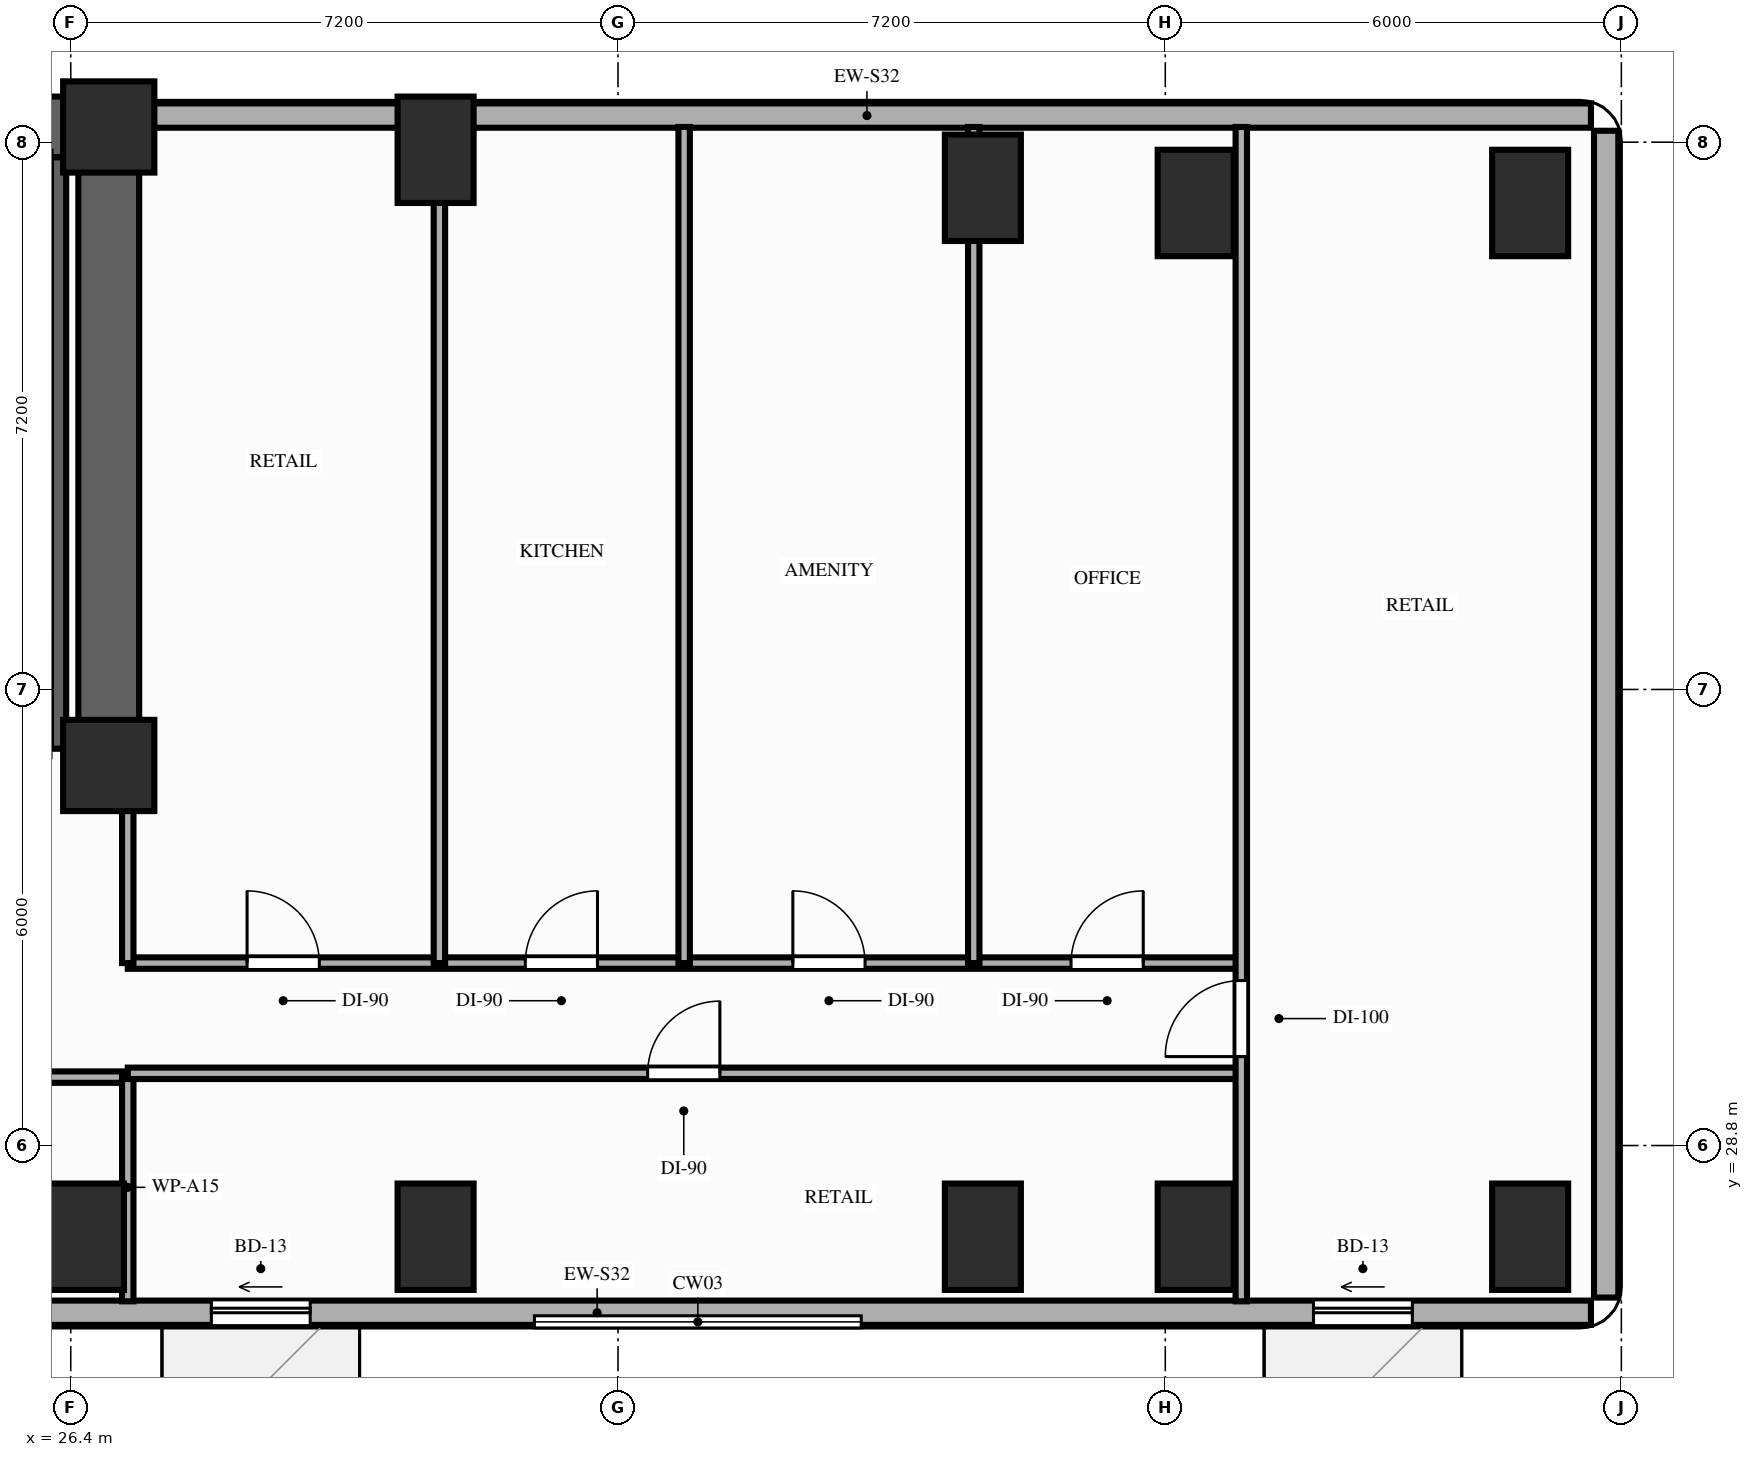
"""IFC4 building model, lengths in metres.
Left out: names, types, materials, properties, quantities, classifications, styles, units other than length and angle.
Written with IfcOpenShell. Run it as: python <this file> out.ifc"""

import sys

from ifc_helpers import new_model, si_unit, direction, frame, frame_2d, origin, origin_2d, place, context, subcontext, project, spatial, rectangle, extrude, element, fill, save


model = new_model("IFC4")
c1 = context("Model", 3, precision=1e-05, world=origin(), true_north=direction((0.0, 1.0)))
c2 = subcontext(c1, "Body", "Model", "MODEL_VIEW")
j1 = project(units=[si_unit("LENGTHUNIT", "METRE"), si_unit("PLANEANGLEUNIT", "RADIAN")], contexts=[c1])
p1 = place(None, origin())
s1 = spatial("IfcSite", under=j1, at=p1, CompositionType="ELEMENT")
p2 = place(p1, origin())
s2 = spatial("IfcBuilding", under=s1, at=p2, CompositionType="ELEMENT")
p3 = place(p2, frame((0.0, 0.0, 56.4)))
s3 = spatial("IfcBuildingStorey", under=s2, at=p3, CompositionType="ELEMENT", Elevation=56.4)
for number, where, z_axis, x_axis in (
    (1, (26.9, 33.8, 0.0), (0.0, 0.0, 1.0), (1.0, 0.0, 0.0)),
    (2, (26.9, 42.2, 0.0), (0.0, 0.0, 1.0), (1.0, 0.0, 0.0)),
):
    element("IfcColumn", number, at=place(p3, frame(where, z_axis=z_axis, x_axis=x_axis)), inside=s3, PredefinedType="COLUMN", context=c2, shape_type="SweptSolid", body=[
        extrude(rectangle(XDim=1.2, YDim=1.2, at=origin_2d()), origin(), (0.0, 0.0, 1.0), 3.2),
    ])
for number, where, z_axis, x_axis in (
    (3, (26.6, 27.6, 0.0), (0.0, 0.0, 1.0), (1.0, 0.0, 0.0)),
    (4, (31.2, 27.6, 0.0), (0.0, 0.0, 1.0), (1.0, 0.0, 0.0)),
    (5, (31.2, 41.9, 0.0), (0.0, 0.0, 1.0), (1.0, 0.0, 0.0)),
    (6, (38.4, 27.6, 0.0), (0.0, 0.0, 1.0), (1.0, 0.0, 0.0)),
    (7, (38.4, 41.4, 0.0), (0.0, 0.0, 1.0), (1.0, 0.0, 0.0)),
    (8, (41.2, 27.6, 0.0), (0.0, 0.0, 1.0), (1.0, 0.0, 0.0)),
    (9, (41.2, 41.2, 0.0), (0.0, 0.0, 1.0), (1.0, 0.0, 0.0)),
    (10, (45.6, 27.6, 0.0), (0.0, 0.0, 1.0), (1.0, 0.0, 0.0)),
    (11, (45.6, 41.2, 0.0), (0.0, 0.0, 1.0), (1.0, 0.0, 0.0)),
):
    element("IfcColumn", number, at=place(p3, frame(where, z_axis=z_axis, x_axis=x_axis)), inside=s3, PredefinedType="COLUMN", context=c2, shape_type="SweptSolid", body=[
        extrude(rectangle(XDim=1.0, YDim=1.4, at=origin_2d()), origin(), (0.0, 0.0, 1.0), 3.2),
    ])
p4 = place(p3, frame((46.4, 42.35, 0.0), z_axis=(0.0, 0.0, 1.0), x_axis=(-1.0, 0.0, 0.0)))
e12 = element("IfcWall", 12, at=p4, inside=s3, PredefinedType="STANDARD", context=c2, shape_type="SweptSolid", body=[
    extrude(rectangle(XDim=19.05, YDim=0.32, at=frame_2d((9.525, 0.0))), origin(), (0.0, 0.0, 1.0), 2.4),
])
p5 = place(p3, frame((20.25, 26.6, 0.0), z_axis=(0.0, 0.0, 1.0), x_axis=(1.0, 0.0, 0.0)))
e13 = element("IfcWall", 13, at=p5, inside=s3, PredefinedType="STANDARD", context=c2, shape_type="SweptSolid", body=[
    extrude(rectangle(XDim=26.15, YDim=0.32, at=frame_2d((13.075, 0.0))), origin(), (0.0, 0.0, 1.0), 3.02),
])
p6 = place(p5, frame((8.0, 0.0, 0.0)))
e14 = element("IfcOpeningElement", 14, at=p6, cuts=e13, PredefinedType="OPENING", context=c2, shape_type="SweptSolid", body=[
    extrude(rectangle(XDim=1.3, YDim=2.08, at=frame_2d((0.65, 1.04))), frame((0.0, 0.17, 0.0), z_axis=(0.0, -1.0, 0.0), x_axis=(1.0, 0.0, 0.0)), (0.0, 0.0, 1.0), 0.34),
])
p7 = place(p5, frame((22.5, 0.0, 0.0)))
e15 = element("IfcOpeningElement", 15, at=p7, cuts=e13, PredefinedType="OPENING", context=c2, shape_type="SweptSolid", body=[
    extrude(rectangle(XDim=1.3, YDim=2.08, at=frame_2d((0.65, 1.04))), frame((0.0, 0.17, 0.0), z_axis=(0.0, -1.0, 0.0), x_axis=(1.0, 0.0, 0.0)), (0.0, 0.0, 1.0), 0.34),
])
p8 = place(p5, frame((1.95, 0.0, 0.85)))
e16 = element("IfcOpeningElement", 16, at=p8, cuts=e13, PredefinedType="OPENING", context=c2, shape_type="SweptSolid", body=[
    extrude(rectangle(XDim=2.4, YDim=1.8, at=frame_2d((1.2, 0.9))), frame((0.0, 0.17, 0.0), z_axis=(0.0, -1.0, 0.0), x_axis=(1.0, 0.0, 0.0)), (0.0, 0.0, 1.0), 0.34),
])
p9 = place(p3, frame((46.6, 26.8, 0.0), z_axis=(0.0, 0.0, 1.0), x_axis=(0.0, 1.0, 0.0)))
e17 = element("IfcWall", 17, at=p9, inside=s3, PredefinedType="STANDARD", context=c2, shape_type="SweptSolid", body=[
    extrude(rectangle(XDim=15.35, YDim=0.32, at=frame_2d((7.675, 0.0))), origin(), (0.0, 0.0, 1.0), 3.02),
])
p10 = place(p3, frame((6.45, 42.2, 0.0), z_axis=(0.0, 0.0, 1.0), x_axis=(1.0, 0.0, 0.0)))
e18 = element("IfcWall", 18, at=p10, inside=s3, PredefinedType="SHEAR", context=c2, shape_type="SweptSolid", body=[
    extrude(rectangle(XDim=20.45, YDim=0.8, at=frame_2d((10.225, 0.0))), origin(), (0.0, 0.0, 1.0), 3.02),
])
p11 = place(p3, frame((26.9, 33.8, 0.0), z_axis=(0.0, 0.0, 1.0), x_axis=(0.0, 1.0, 0.0)))
e19 = element("IfcWall", 19, at=p11, inside=s3, PredefinedType="SHEAR", context=c2, shape_type="SweptSolid", body=[
    extrude(rectangle(XDim=7.95, YDim=0.8, at=frame_2d((3.975, 0.0))), origin(), (0.0, 0.0, 1.0), 3.02),
])
p12 = place(p3, frame((26.24, 34.02, 0.0), z_axis=(0.0, 0.0, 1.0), x_axis=(0.0, 1.0, 0.0)))
e20 = element("IfcWall", 20, at=p12, inside=s3, PredefinedType="SHEAR", context=c2, shape_type="SweptSolid", body=[
    extrude(rectangle(XDim=7.78, YDim=0.2, at=frame_2d((3.89, 0.0))), origin(), (0.0, 0.0, 1.0), 3.02),
])
p13 = place(p3, frame((20.45, 29.7, 0.0), z_axis=(0.0, 0.0, 1.0), x_axis=(1.0, 0.0, 0.0)))
e21 = element("IfcWall", 21, at=p13, inside=s3, PredefinedType="PARTITIONING", context=c2, shape_type="SweptSolid", body=[
    extrude(rectangle(XDim=6.7, YDim=0.15, at=frame_2d((3.35, 0.0))), origin(), (0.0, 0.0, 1.0), 3.02),
])
p14 = place(p13, frame((2.8, 0.0, 0.0)))
e22 = element("IfcOpeningElement", 22, at=p14, cuts=e21, PredefinedType="OPENING", context=c2, shape_type="SweptSolid", body=[
    extrude(rectangle(XDim=0.95, YDim=2.15, at=frame_2d((0.475, 1.075))), frame((0.0, 0.085, 0.0), z_axis=(0.0, -1.0, 0.0), x_axis=(1.0, 0.0, 0.0)), (0.0, 0.0, 1.0), 0.17),
])
p15 = place(p3, frame((27.15, 26.75, 0.0), z_axis=(0.0, 0.0, 1.0), x_axis=(0.0, 1.0, 0.0)))
e23 = element("IfcWall", 23, at=p15, inside=s3, PredefinedType="PARTITIONING", context=c2, shape_type="SweptSolid", body=[
    extrude(rectangle(XDim=3.0, YDim=0.15, at=frame_2d((1.5, 0.0))), origin(), (0.0, 0.0, 1.0), 2.4),
])
p16 = place(p3, frame((27.15, 29.75, 0.0), z_axis=(0.0, 0.0, 1.0), x_axis=(1.0, 0.0, 0.0)))
e24 = element("IfcWall", 24, at=p16, inside=s3, PredefinedType="PARTITIONING", context=c2, shape_type="SweptSolid", body=[
    extrude(rectangle(XDim=14.65, YDim=0.15, at=frame_2d((7.325, 0.0))), origin(), (0.0, 0.0, 1.0), 2.4),
])
p17 = place(p16, frame((6.84, 0.0, 0.0)))
e25 = element("IfcOpeningElement", 25, at=p17, cuts=e24, PredefinedType="OPENING", context=c2, shape_type="SweptSolid", body=[
    extrude(rectangle(XDim=0.95, YDim=2.15, at=frame_2d((0.475, 1.075))), frame((0.0, 0.085, 0.0), z_axis=(0.0, -1.0, 0.0), x_axis=(1.0, 0.0, 0.0)), (0.0, 0.0, 1.0), 0.17),
])
p18 = place(p3, frame((27.15, 31.2, 0.0), z_axis=(0.0, 0.0, 1.0), x_axis=(1.0, 0.0, 0.0)))
e26 = element("IfcWall", 26, at=p18, inside=s3, PredefinedType="PARTITIONING", context=c2, shape_type="SweptSolid", body=[
    extrude(rectangle(XDim=14.65, YDim=0.15, at=frame_2d((7.325, 0.0))), origin(), (0.0, 0.0, 1.0), 2.4),
])
p19 = place(p18, frame((1.57, 0.0, 0.0)))
e27 = element("IfcOpeningElement", 27, at=p19, cuts=e26, PredefinedType="OPENING", context=c2, shape_type="SweptSolid", body=[
    extrude(rectangle(XDim=0.95, YDim=2.15, at=frame_2d((0.475, 1.075))), frame((0.0, 0.085, 0.0), z_axis=(0.0, -1.0, 0.0), x_axis=(1.0, 0.0, 0.0)), (0.0, 0.0, 1.0), 0.17),
])
p20 = place(p18, frame((5.23, 0.0, 0.0)))
e28 = element("IfcOpeningElement", 28, at=p20, cuts=e26, PredefinedType="OPENING", context=c2, shape_type="SweptSolid", body=[
    extrude(rectangle(XDim=0.95, YDim=2.15, at=frame_2d((0.475, 1.075))), frame((0.0, 0.085, 0.0), z_axis=(0.0, -1.0, 0.0), x_axis=(1.0, 0.0, 0.0)), (0.0, 0.0, 1.0), 0.17),
])
p21 = place(p18, frame((8.75, 0.0, 0.0)))
e29 = element("IfcOpeningElement", 29, at=p21, cuts=e26, PredefinedType="OPENING", context=c2, shape_type="SweptSolid", body=[
    extrude(rectangle(XDim=0.95, YDim=2.15, at=frame_2d((0.475, 1.075))), frame((0.0, 0.085, 0.0), z_axis=(0.0, -1.0, 0.0), x_axis=(1.0, 0.0, 0.0)), (0.0, 0.0, 1.0), 0.17),
])
p22 = place(p18, frame((12.41, 0.0, 0.0)))
e30 = element("IfcOpeningElement", 30, at=p22, cuts=e26, PredefinedType="OPENING", context=c2, shape_type="SweptSolid", body=[
    extrude(rectangle(XDim=0.95, YDim=2.15, at=frame_2d((0.475, 1.075))), frame((0.0, 0.085, 0.0), z_axis=(0.0, -1.0, 0.0), x_axis=(1.0, 0.0, 0.0)), (0.0, 0.0, 1.0), 0.17),
])
p23 = place(p3, frame((27.15, 31.2, 0.0), z_axis=(0.0, 0.0, 1.0), x_axis=(0.0, 1.0, 0.0)))
e31 = element("IfcWall", 31, at=p23, inside=s3, PredefinedType="PARTITIONING", context=c2, shape_type="SweptSolid", body=[
    extrude(rectangle(XDim=2.48, YDim=0.15, at=frame_2d((1.24, 0.0))), origin(), (0.0, 0.0, 1.0), 2.4),
])
p24 = place(p3, frame((41.8, 26.75, 0.0), z_axis=(0.0, 0.0, 1.0), x_axis=(0.0, 1.0, 0.0)))
e32 = element("IfcWall", 32, at=p24, inside=s3, PredefinedType="PARTITIONING", context=c2, shape_type="SweptSolid", body=[
    extrude(rectangle(XDim=15.45, YDim=0.15, at=frame_2d((7.725, 0.0))), origin(), (0.0, 0.0, 1.0), 2.4),
])
p25 = place(p24, frame((3.22, 0.0, 0.0)))
e33 = element("IfcOpeningElement", 33, at=p25, cuts=e32, PredefinedType="OPENING", context=c2, shape_type="SweptSolid", body=[
    extrude(rectangle(XDim=1.0, YDim=2.15, at=frame_2d((0.5, 1.075))), frame((0.0, 0.085, 0.0), z_axis=(0.0, -1.0, 0.0), x_axis=(1.0, 0.0, 0.0)), (0.0, 0.0, 1.0), 0.17),
])
for number, where, z_axis, x_axis in (
    (34, (31.25, 31.2, 0.0), (0.0, 0.0, 1.0), (0.0, 1.0, 0.0)),
    (35, (34.47, 31.2, 0.0), (0.0, 0.0, 1.0), (0.0, 1.0, 0.0)),
    (36, (38.28, 31.2, 0.0), (0.0, 0.0, 1.0), (0.0, 1.0, 0.0)),
):
    element("IfcWall", number, at=place(p3, frame(where, z_axis=z_axis, x_axis=x_axis)), inside=s3, PredefinedType="PARTITIONING", context=c2, shape_type="SweptSolid", body=[
        extrude(rectangle(XDim=11.0, YDim=0.15, at=frame_2d((5.5, 0.0))), origin(), (0.0, 0.0, 1.0), 2.4),
    ])
p26 = place(p6, origin())
e37 = element("IfcDoor", 37, at=p26, inside=s3, OperationType="SLIDING_TO_LEFT", PredefinedType="DOOR", context=c2, shape_type="SweptSolid", body=[
    extrude(rectangle(XDim=1.3, YDim=2.08, at=frame_2d((0.65, 1.04))), frame((0.0, 0.025, 0.0), z_axis=(0.0, -1.0, 0.0), x_axis=(1.0, 0.0, 0.0)), (0.0, 0.0, 1.0), 0.05),
])
fill(e14, e37)
p27 = place(p7, origin())
e38 = element("IfcDoor", 38, at=p27, inside=s3, OperationType="SLIDING_TO_LEFT", PredefinedType="DOOR", context=c2, shape_type="SweptSolid", body=[
    extrude(rectangle(XDim=1.3, YDim=2.08, at=frame_2d((0.65, 1.04))), frame((0.0, 0.025, 0.0), z_axis=(0.0, -1.0, 0.0), x_axis=(1.0, 0.0, 0.0)), (0.0, 0.0, 1.0), 0.05),
])
fill(e15, e38)
p28 = place(p25, origin())
e39 = element("IfcDoor", 39, at=p28, inside=s3, OperationType="SINGLE_SWING_LEFT", PredefinedType="DOOR", context=c2, shape_type="SweptSolid", body=[
    extrude(rectangle(XDim=1.0, YDim=2.15, at=frame_2d((0.5, 1.075))), frame((0.0, 0.025, 0.0), z_axis=(0.0, -1.0, 0.0), x_axis=(1.0, 0.0, 0.0)), (0.0, 0.0, 1.0), 0.05),
])
fill(e33, e39)
p29 = place(p17, origin())
e40 = element("IfcDoor", 40, at=p29, inside=s3, OperationType="SINGLE_SWING_RIGHT", PredefinedType="DOOR", context=c2, shape_type="SweptSolid", body=[
    extrude(rectangle(XDim=0.95, YDim=2.15, at=frame_2d((0.475, 1.075))), frame((0.0, 0.025, 0.0), z_axis=(0.0, -1.0, 0.0), x_axis=(1.0, 0.0, 0.0)), (0.0, 0.0, 1.0), 0.05),
])
fill(e25, e40)
p30 = place(p19, origin())
e41 = element("IfcDoor", 41, at=p30, inside=s3, OperationType="SINGLE_SWING_LEFT", PredefinedType="DOOR", context=c2, shape_type="SweptSolid", body=[
    extrude(rectangle(XDim=0.95, YDim=2.15, at=frame_2d((0.475, 1.075))), frame((0.0, 0.025, 0.0), z_axis=(0.0, -1.0, 0.0), x_axis=(1.0, 0.0, 0.0)), (0.0, 0.0, 1.0), 0.05),
])
fill(e27, e41)
p31 = place(p20, origin())
e42 = element("IfcDoor", 42, at=p31, inside=s3, OperationType="SINGLE_SWING_RIGHT", PredefinedType="DOOR", context=c2, shape_type="SweptSolid", body=[
    extrude(rectangle(XDim=0.95, YDim=2.15, at=frame_2d((0.475, 1.075))), frame((0.0, 0.025, 0.0), z_axis=(0.0, -1.0, 0.0), x_axis=(1.0, 0.0, 0.0)), (0.0, 0.0, 1.0), 0.05),
])
fill(e28, e42)
p32 = place(p21, origin())
e43 = element("IfcDoor", 43, at=p32, inside=s3, OperationType="SINGLE_SWING_LEFT", PredefinedType="DOOR", context=c2, shape_type="SweptSolid", body=[
    extrude(rectangle(XDim=0.95, YDim=2.15, at=frame_2d((0.475, 1.075))), frame((0.0, 0.025, 0.0), z_axis=(0.0, -1.0, 0.0), x_axis=(1.0, 0.0, 0.0)), (0.0, 0.0, 1.0), 0.05),
])
fill(e29, e43)
p33 = place(p22, origin())
e44 = element("IfcDoor", 44, at=p33, inside=s3, OperationType="SINGLE_SWING_RIGHT", PredefinedType="DOOR", context=c2, shape_type="SweptSolid", body=[
    extrude(rectangle(XDim=0.95, YDim=2.15, at=frame_2d((0.475, 1.075))), frame((0.0, 0.025, 0.0), z_axis=(0.0, -1.0, 0.0), x_axis=(1.0, 0.0, 0.0)), (0.0, 0.0, 1.0), 0.05),
])
fill(e30, e44)
save(model, sys.argv[1])
